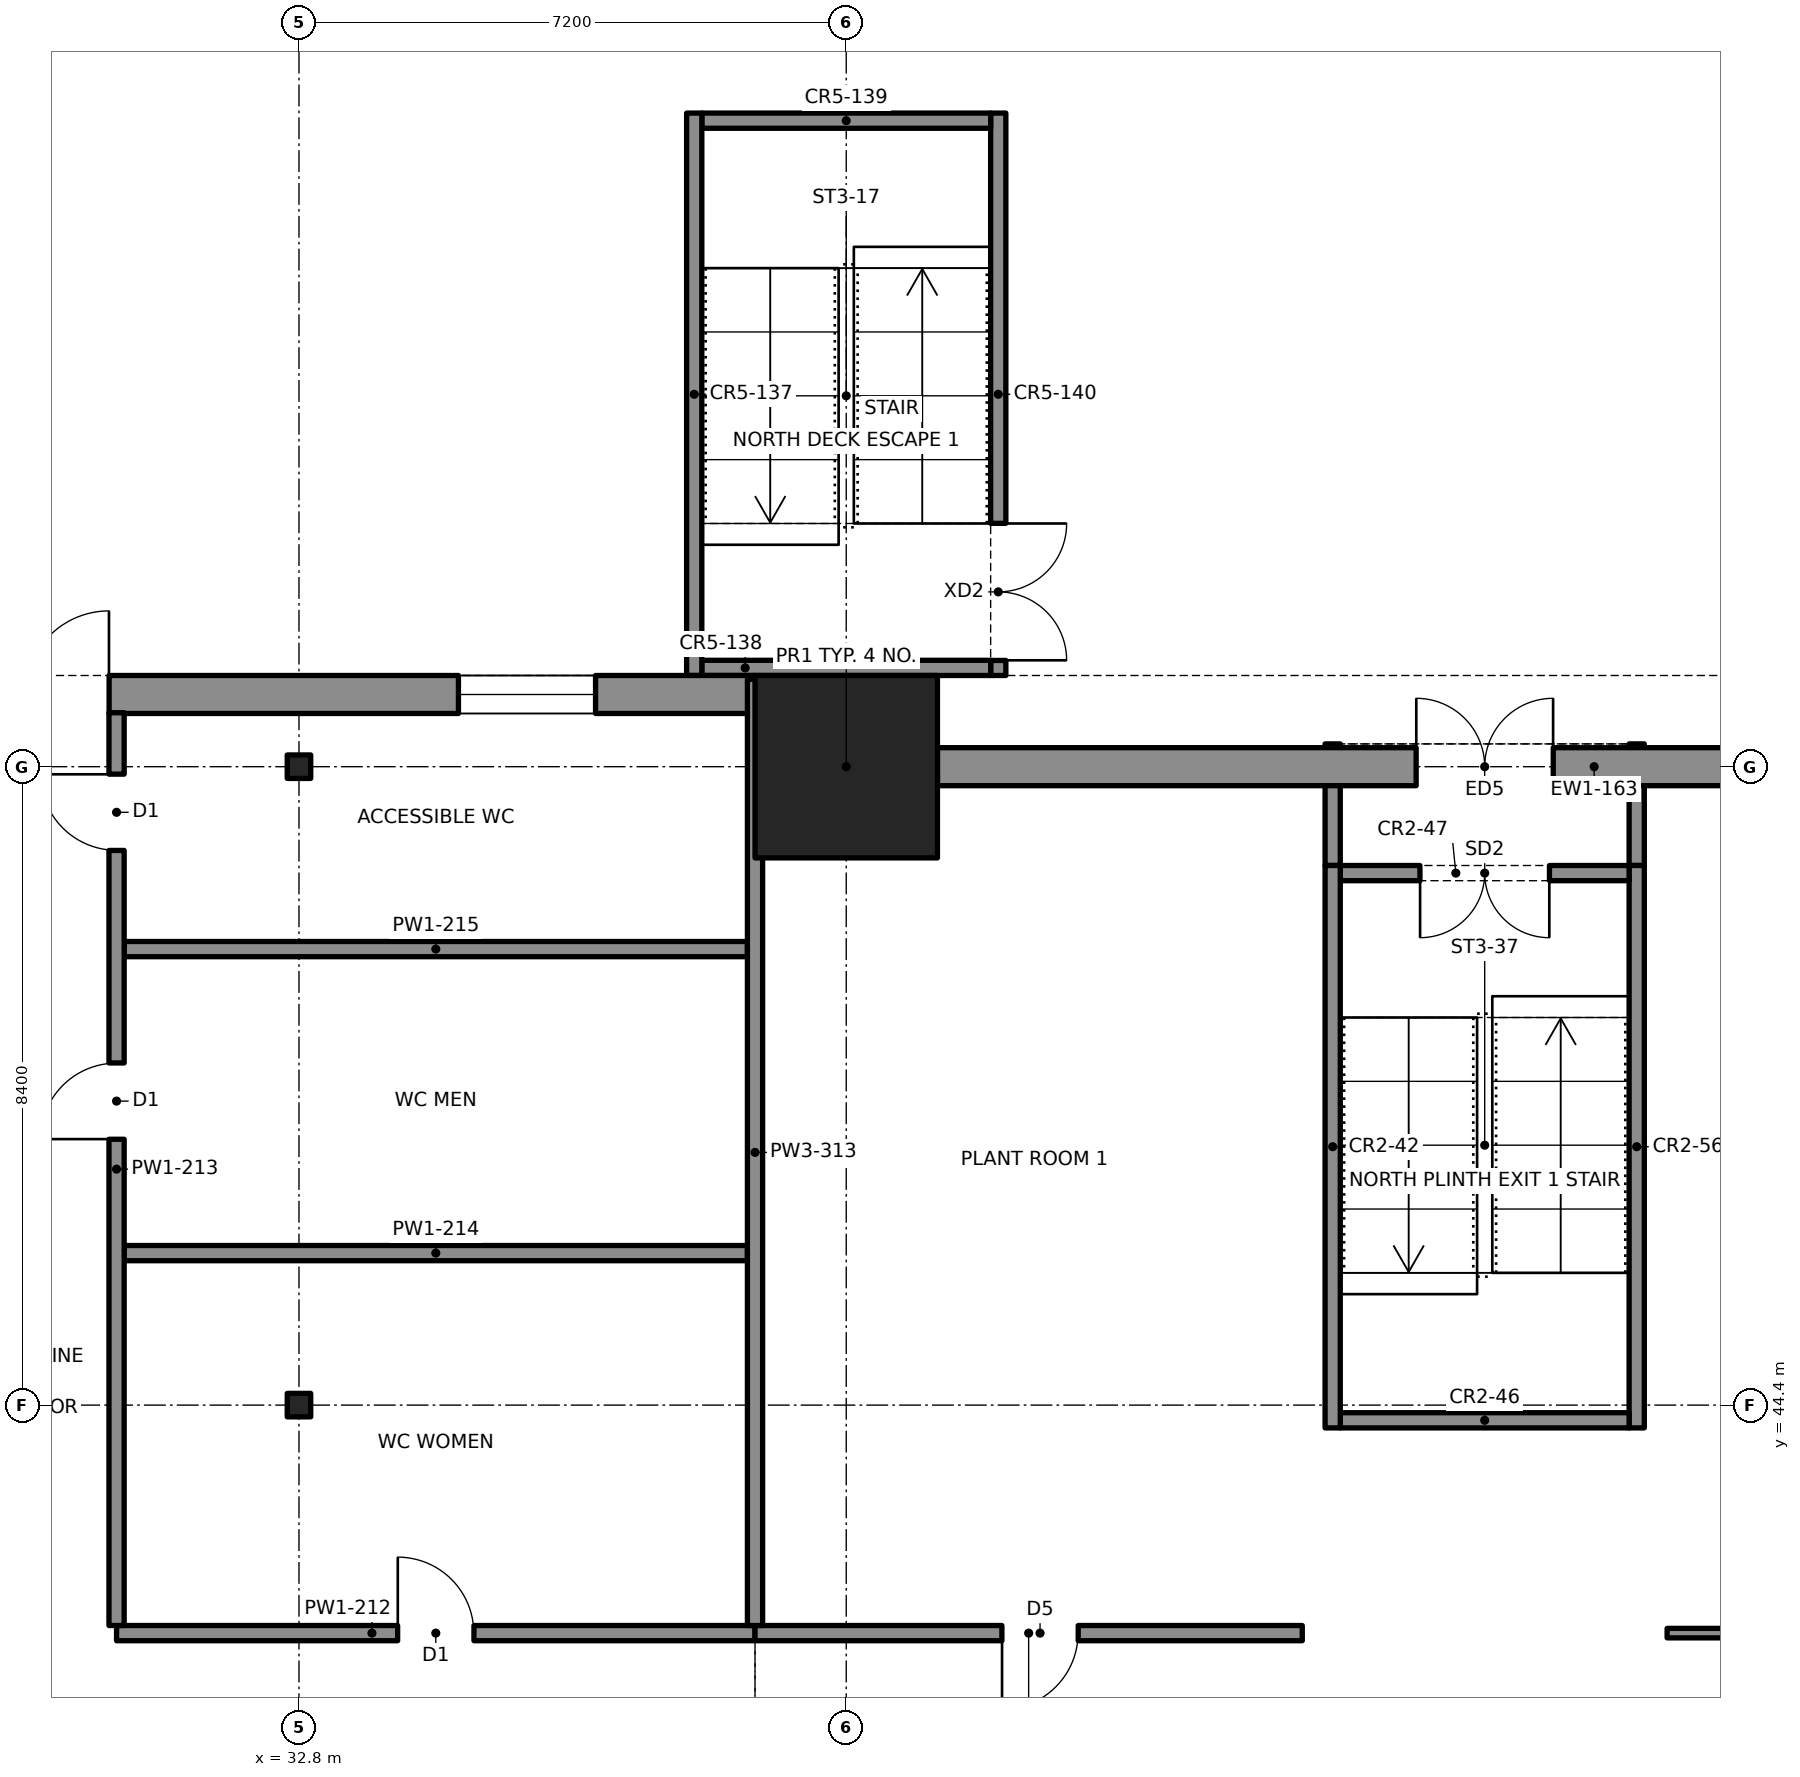
"""IFC4 building model, lengths in metres.
Left out: names, types, materials, properties, quantities, classifications, styles, units other than length and angle.
Written with IfcOpenShell. Run it as: python <this file> out.ifc"""

import sys

from ifc_helpers import new_model, si_unit, direction, frame, frame_2d, origin, origin_2d, place, context, subcontext, project, spatial, rectangle, i_section, extrude, element, fill, save


model = new_model("IFC4")
c1 = context("Model", 3, precision=1e-05, world=origin(), true_north=direction((0.0, 1.0)))
c2 = subcontext(c1, "Body", "Model", "MODEL_VIEW")
j1 = project(units=[si_unit("LENGTHUNIT", "METRE"), si_unit("PLANEANGLEUNIT", "RADIAN")], contexts=[c1])
p1 = place(None, origin())
s1 = spatial("IfcSite", under=j1, at=p1, CompositionType="ELEMENT")
p2 = place(p1, origin())
s2 = spatial("IfcBuilding", under=s1, at=p2, CompositionType="ELEMENT")
p3 = place(p2, origin())
s3 = spatial("IfcBuildingStorey", under=s2, at=p3, CompositionType="ELEMENT", Elevation=0.0)
p4 = place(p3, frame((40.0, 52.8, -0.9), z_axis=(0.0, 0.0, 1.0), x_axis=(1.0, 0.0, 0.0)))
e1 = element("IfcColumn", 1, at=p4, inside=s3, PredefinedType="COLUMN", context=c2, shape_type="SweptSolid", body=[
    extrude(rectangle(XDim=2.4, YDim=2.4, at=origin_2d()), origin(), (0.0, 0.0, 1.0), 5.3),
])
for number, where, z_axis, x_axis in (
    (2, (32.8, 44.4, -0.9), (0.0, 0.0, 1.0), (1.0, 0.0, 0.0)),
    (3, (32.8, 52.8, -0.9), (0.0, 0.0, 1.0), (1.0, 0.0, 0.0)),
):
    element("IfcColumn", number, at=place(p3, frame(where, z_axis=z_axis, x_axis=x_axis)), inside=s3, PredefinedType="COLUMN", context=c2, shape_type="SweptSolid", body=[
        extrude(i_section(OverallWidth=0.309, OverallDepth=0.323, WebThickness=0.014, FlangeThickness=0.023, at=origin_2d()), origin(), (0.0, 0.0, 1.0), 5.3),
    ])
p5 = place(p3, frame((41.2, 52.8, 0.0), z_axis=(0.0, 0.0, 1.0), x_axis=(1.0, 0.0, 0.0)))
e4 = element("IfcWall", 4, at=p5, inside=s3, PredefinedType="SOLIDWALL", context=c2, shape_type="SweptSolid", body=[
    extrude(rectangle(XDim=14.4, YDim=0.5, at=frame_2d((7.2, 0.0))), origin(), (0.0, 0.0, 1.0), 3.65),
])
p6 = place(p5, frame((6.3, 0.0, 0.0)))
e5 = element("IfcOpeningElement", 5, at=p6, cuts=e4, PredefinedType="OPENING", context=c2, shape_type="SweptSolid", body=[
    extrude(rectangle(XDim=1.8, YDim=2.4, at=frame_2d((0.9, 1.2))), frame((0.0, 0.26, 0.0), z_axis=(0.0, -1.0, 0.0), x_axis=(1.0, 0.0, 0.0)), (0.0, 0.0, 1.0), 0.52),
])
p7 = place(p3, frame((17.2, 53.75, 0.0), z_axis=(0.0, 0.0, 1.0), x_axis=(1.0, 0.0, 0.0)))
e6 = element("IfcWall", 6, at=p7, inside=s3, PredefinedType="SOLIDWALL", context=c2, shape_type="SweptSolid", body=[
    extrude(rectangle(XDim=21.6, YDim=0.5, at=frame_2d((10.8, 0.0))), origin(), (0.0, 0.0, 1.0), 4.4),
])
p8 = place(p7, frame((0.9, 0.0, 0.9)))
e7 = element("IfcOpeningElement", 7, at=p8, cuts=e6, PredefinedType="OPENING", context=c2, shape_type="SweptSolid", body=[
    extrude(rectangle(XDim=1.8, YDim=2.0, at=frame_2d((0.9, 1.0))), frame((0.0, 0.26, 0.0), z_axis=(0.0, -1.0, 0.0), x_axis=(1.0, 0.0, 0.0)), (0.0, 0.0, 1.0), 0.52),
])
p9 = place(p7, frame((5.7, 0.0, 0.9)))
e8 = element("IfcOpeningElement", 8, at=p9, cuts=e6, PredefinedType="OPENING", context=c2, shape_type="SweptSolid", body=[
    extrude(rectangle(XDim=1.8, YDim=2.0, at=frame_2d((0.9, 1.0))), frame((0.0, 0.26, 0.0), z_axis=(0.0, -1.0, 0.0), x_axis=(1.0, 0.0, 0.0)), (0.0, 0.0, 1.0), 0.52),
])
p10 = place(p7, frame((17.7, 0.0, 0.9)))
e9 = element("IfcOpeningElement", 9, at=p10, cuts=e6, PredefinedType="OPENING", context=c2, shape_type="SweptSolid", body=[
    extrude(rectangle(XDim=1.8, YDim=2.0, at=frame_2d((0.9, 1.0))), frame((0.0, 0.26, 0.0), z_axis=(0.0, -1.0, 0.0), x_axis=(1.0, 0.0, 0.0)), (0.0, 0.0, 1.0), 0.52),
])
p11 = place(p7, frame((10.9, 0.0, 0.0)))
e10 = element("IfcOpeningElement", 10, at=p11, cuts=e6, PredefinedType="OPENING", context=c2, shape_type="SweptSolid", body=[
    extrude(rectangle(XDim=2.2, YDim=2.4, at=frame_2d((1.1, 1.2))), frame((0.0, 0.26, 0.0), z_axis=(0.0, -1.0, 0.0), x_axis=(1.0, 0.0, 0.0)), (0.0, 0.0, 1.0), 0.52),
])
p12 = place(p3, frame((38.0, 54.0, 0.0), z_axis=(0.0, 0.0, 1.0), x_axis=(0.0, 1.0, 0.0)))
e11 = element("IfcWall", 11, at=p12, inside=s3, PredefinedType="SOLIDWALL", context=c2, shape_type="SweptSolid", body=[
    extrude(rectangle(XDim=7.4, YDim=0.2, at=frame_2d((3.7, 0.0))), origin(), (0.0, 0.0, 1.0), 4.4),
])
p13 = place(p3, frame((42.0, 61.4, 0.0), z_axis=(0.0, 0.0, 1.0), x_axis=(0.0, -1.0, 0.0)))
e12 = element("IfcWall", 12, at=p13, inside=s3, PredefinedType="SOLIDWALL", context=c2, shape_type="SweptSolid", body=[
    extrude(rectangle(XDim=7.4, YDim=0.2, at=frame_2d((3.7, 0.0))), origin(), (0.0, 0.0, 1.0), 4.4),
])
p14 = place(p13, frame((5.4, 0.0, 0.0)))
e13 = element("IfcOpeningElement", 13, at=p14, cuts=e12, PredefinedType="OPENING", context=c2, shape_type="SweptSolid", body=[
    extrude(rectangle(XDim=1.8, YDim=2.1, at=frame_2d((0.9, 1.05))), frame((0.0, 0.11, 0.0), z_axis=(0.0, -1.0, 0.0), x_axis=(1.0, 0.0, 0.0)), (0.0, 0.0, 1.0), 0.22),
])
for number, where, z_axis, x_axis in (
    (14, (38.1, 54.1, 0.0), (0.0, 0.0, 1.0), (1.0, 0.0, 0.0)),
    (15, (38.1, 61.3, 0.0), (0.0, 0.0, 1.0), (1.0, 0.0, 0.0)),
):
    element("IfcWall", number, at=place(p3, frame(where, z_axis=z_axis, x_axis=x_axis)), inside=s3, PredefinedType="SOLIDWALL", context=c2, shape_type="SweptSolid", body=[
        extrude(rectangle(XDim=3.8, YDim=0.2, at=frame_2d((1.9, 0.0))), origin(), (0.0, 0.0, 1.0), 4.4),
    ])
for number, where, z_axis, x_axis in (
    (16, (46.4, 44.1, 0.0), (0.0, 0.0, 1.0), (0.0, 1.0, 0.0)),
    (17, (50.4, 44.1, 0.0), (0.0, 0.0, 1.0), (0.0, 1.0, 0.0)),
):
    element("IfcWall", number, at=place(p3, frame(where, z_axis=z_axis, x_axis=x_axis)), inside=s3, PredefinedType="SOLIDWALL", context=c2, shape_type="SweptSolid", body=[
        extrude(rectangle(XDim=7.4, YDim=0.2, at=frame_2d((3.7, 0.0))), origin(), (0.0, 0.0, 1.0), 4.4),
    ])
p15 = place(p3, frame((46.5, 44.2, 0.0), z_axis=(0.0, 0.0, 1.0), x_axis=(1.0, 0.0, 0.0)))
e18 = element("IfcWall", 18, at=p15, inside=s3, PredefinedType="SOLIDWALL", context=c2, shape_type="SweptSolid", body=[
    extrude(rectangle(XDim=3.8, YDim=0.2, at=frame_2d((1.9, 0.0))), origin(), (0.0, 0.0, 1.0), 4.4),
])
p16 = place(p3, frame((46.5, 51.4, 0.0), z_axis=(0.0, 0.0, 1.0), x_axis=(1.0, 0.0, 0.0)))
e19 = element("IfcWall", 19, at=p16, inside=s3, PredefinedType="SOLIDWALL", context=c2, shape_type="SweptSolid", body=[
    extrude(rectangle(XDim=3.8, YDim=0.2, at=frame_2d((1.9, 0.0))), origin(), (0.0, 0.0, 1.0), 4.4),
])
p17 = place(p16, frame((1.05, 0.0, 0.0)))
e20 = element("IfcOpeningElement", 20, at=p17, cuts=e19, PredefinedType="OPENING", context=c2, shape_type="SweptSolid", body=[
    extrude(rectangle(XDim=1.7, YDim=2.1, at=frame_2d((0.85, 1.05))), frame((0.0, 0.11, 0.0), z_axis=(0.0, -1.0, 0.0), x_axis=(1.0, 0.0, 0.0)), (0.0, 0.0, 1.0), 0.22),
])
for number, where, z_axis, x_axis in (
    (21, (46.4, 51.5, 0.0), (0.0, 0.0, 1.0), (0.0, 1.0, 0.0)),
    (22, (50.4, 51.5, 0.0), (0.0, 0.0, 1.0), (0.0, 1.0, 0.0)),
):
    element("IfcWall", number, at=place(p3, frame(where, z_axis=z_axis, x_axis=x_axis)), inside=s3, PredefinedType="SOLIDWALL", context=c2, shape_type="SweptSolid", body=[
        extrude(rectangle(XDim=1.6, YDim=0.2, at=frame_2d((0.8, 0.0))), origin(), (0.0, 0.0, 1.0), 4.4),
    ])
p18 = place(p3, frame((30.4, 41.4, 0.0), z_axis=(0.0, 0.0, 1.0), x_axis=(1.0, 0.0, 0.0)))
e23 = element("IfcWall", 23, at=p18, inside=s3, PredefinedType="PARTITIONING", context=c2, shape_type="SweptSolid", body=[
    extrude(rectangle(XDim=8.4, YDim=0.2, at=frame_2d((4.2, 0.0))), origin(), (0.0, 0.0, 1.0), 3.65),
])
p19 = place(p18, frame((3.7, 0.0, 0.0)))
e24 = element("IfcOpeningElement", 24, at=p19, cuts=e23, PredefinedType="OPENING", context=c2, shape_type="SweptSolid", body=[
    extrude(rectangle(XDim=1.0, YDim=2.1, at=frame_2d((0.5, 1.05))), frame((0.0, 0.11, 0.0), z_axis=(0.0, -1.0, 0.0), x_axis=(1.0, 0.0, 0.0)), (0.0, 0.0, 1.0), 0.22),
])
p20 = place(p3, frame((38.8, 41.4, 0.0), z_axis=(0.0, 0.0, 1.0), x_axis=(1.0, 0.0, 0.0)))
e25 = element("IfcWall", 25, at=p20, inside=s3, PredefinedType="PARTITIONING", context=c2, shape_type="SweptSolid", body=[
    extrude(rectangle(XDim=7.2, YDim=0.2, at=frame_2d((3.6, 0.0))), origin(), (0.0, 0.0, 1.0), 3.65),
])
p21 = place(p20, frame((3.25, 0.0, 0.0)))
e26 = element("IfcOpeningElement", 26, at=p21, cuts=e25, PredefinedType="OPENING", context=c2, shape_type="SweptSolid", body=[
    extrude(rectangle(XDim=1.0, YDim=2.1, at=frame_2d((0.5, 1.05))), frame((0.0, 0.11, 0.0), z_axis=(0.0, -1.0, 0.0), x_axis=(1.0, 0.0, 0.0)), (0.0, 0.0, 1.0), 0.22),
])
p22 = place(p3, frame((50.8, 41.4, 0.0), z_axis=(0.0, 0.0, 1.0), x_axis=(1.0, 0.0, 0.0)))
e27 = element("IfcWall", 27, at=p22, inside=s3, PredefinedType="PARTITIONING", context=c2, shape_type="SweptSolid", body=[
    extrude(rectangle(XDim=14.4, YDim=0.125, at=frame_2d((7.2, 0.0))), origin(), (0.0, 0.0, 1.0), 3.65),
])
p23 = place(p22, frame((6.15, 0.0, 0.0)))
e28 = element("IfcOpeningElement", 28, at=p23, cuts=e27, PredefinedType="OPENING", context=c2, shape_type="SweptSolid", body=[
    extrude(rectangle(XDim=1.8, YDim=2.1, at=frame_2d((0.9, 1.05))), frame((0.0, 0.073, 0.0), z_axis=(0.0, -1.0, 0.0), x_axis=(1.0, 0.0, 0.0)), (0.0, 0.0, 1.0), 0.145),
])
for number, where, z_axis, x_axis in (
    (29, (30.5, 46.4, 0.0), (0.0, 0.0, 1.0), (1.0, 0.0, 0.0)),
    (30, (30.5, 50.4, 0.0), (0.0, 0.0, 1.0), (1.0, 0.0, 0.0)),
):
    element("IfcWall", number, at=place(p3, frame(where, z_axis=z_axis, x_axis=x_axis)), inside=s3, PredefinedType="PARTITIONING", context=c2, shape_type="SweptSolid", body=[
        extrude(rectangle(XDim=8.2, YDim=0.2, at=frame_2d((4.1, 0.0))), origin(), (0.0, 0.0, 1.0), 3.65),
    ])
p24 = place(p3, frame((30.4, 41.5, 0.0), z_axis=(0.0, 0.0, 1.0), x_axis=(0.0, 1.0, 0.0)))
e31 = element("IfcWall", 31, at=p24, inside=s3, PredefinedType="PARTITIONING", context=c2, shape_type="SweptSolid", body=[
    extrude(rectangle(XDim=12.01, YDim=0.2, at=frame_2d((6.005, 0.0))), origin(), (0.0, 0.0, 1.0), 3.65),
])
p25 = place(p24, frame((6.4, 0.0, 0.0)))
e32 = element("IfcOpeningElement", 32, at=p25, cuts=e31, PredefinedType="OPENING", context=c2, shape_type="SweptSolid", body=[
    extrude(rectangle(XDim=1.0, YDim=2.1, at=frame_2d((0.5, 1.05))), frame((0.0, 0.11, 0.0), z_axis=(0.0, -1.0, 0.0), x_axis=(1.0, 0.0, 0.0)), (0.0, 0.0, 1.0), 0.22),
])
p26 = place(p24, frame((10.2, 0.0, 0.0)))
e33 = element("IfcOpeningElement", 33, at=p26, cuts=e31, PredefinedType="OPENING", context=c2, shape_type="SweptSolid", body=[
    extrude(rectangle(XDim=1.0, YDim=2.1, at=frame_2d((0.5, 1.05))), frame((0.0, 0.11, 0.0), z_axis=(0.0, -1.0, 0.0), x_axis=(1.0, 0.0, 0.0)), (0.0, 0.0, 1.0), 0.22),
])
p27 = place(p3, frame((38.8, 41.5, 0.0), z_axis=(0.0, 0.0, 1.0), x_axis=(0.0, 1.0, 0.0)))
e34 = element("IfcWall", 34, at=p27, inside=s3, PredefinedType="PARTITIONING", context=c2, shape_type="SweptSolid", body=[
    extrude(rectangle(XDim=12.45, YDim=0.2, at=frame_2d((6.225, 0.0))), origin(), (0.0, 0.0, 1.0), 3.65),
])
p28 = place(p6, origin())
e35 = element("IfcDoor", 35, at=p28, inside=s3, OperationType="DOUBLE_DOOR_SINGLE_SWING", PredefinedType="DOOR", context=c2, shape_type="SweptSolid", body=[
    extrude(rectangle(XDim=1.8, YDim=2.4, at=frame_2d((0.9, 1.2))), frame((0.0, 0.025, 0.0), z_axis=(0.0, -1.0, 0.0), x_axis=(1.0, 0.0, 0.0)), (0.0, 0.0, 1.0), 0.05),
])
fill(e5, e35)
p29 = place(p10, origin())
e36 = element("IfcWindow", 36, at=p29, inside=s3, PartitioningType="SINGLE_PANEL", PredefinedType="WINDOW", context=c2, shape_type="SweptSolid", body=[
    extrude(rectangle(XDim=1.8, YDim=2.0, at=frame_2d((0.9, 1.0))), frame((0.0, 0.03, 0.0), z_axis=(0.0, -1.0, 0.0), x_axis=(1.0, 0.0, 0.0)), (0.0, 0.0, 1.0), 0.06),
])
fill(e9, e36)
p30 = place(p11, origin())
e37 = element("IfcDoor", 37, at=p30, inside=s3, OperationType="DOUBLE_DOOR_SINGLE_SWING", PredefinedType="DOOR", context=c2, shape_type="SweptSolid", body=[
    extrude(rectangle(XDim=2.2, YDim=2.4, at=frame_2d((1.1, 1.2))), frame((0.0, 0.025, 0.0), z_axis=(0.0, -1.0, 0.0), x_axis=(1.0, 0.0, 0.0)), (0.0, 0.0, 1.0), 0.05),
])
fill(e10, e37)
p31 = place(p14, origin())
e38 = element("IfcDoor", 38, at=p31, inside=s3, OperationType="DOUBLE_DOOR_SINGLE_SWING", PredefinedType="DOOR", context=c2, shape_type="SweptSolid", body=[
    extrude(rectangle(XDim=1.8, YDim=2.1, at=frame_2d((0.9, 1.05))), frame((0.0, 0.025, 0.0), z_axis=(0.0, -1.0, 0.0), x_axis=(1.0, 0.0, 0.0)), (0.0, 0.0, 1.0), 0.05),
])
fill(e13, e38)
p32 = place(p17, origin())
e39 = element("IfcDoor", 39, at=p32, inside=s3, OperationType="DOUBLE_DOOR_SINGLE_SWING", PredefinedType="DOOR", context=c2, shape_type="SweptSolid", body=[
    extrude(rectangle(XDim=1.7, YDim=2.1, at=frame_2d((0.85, 1.05))), frame((0.0, 0.025, 0.0), z_axis=(0.0, -1.0, 0.0), x_axis=(1.0, 0.0, 0.0)), (0.0, 0.0, 1.0), 0.05),
])
fill(e20, e39)
p33 = place(p19, origin())
e40 = element("IfcDoor", 40, at=p33, inside=s3, OperationType="SINGLE_SWING_LEFT", PredefinedType="DOOR", context=c2, shape_type="SweptSolid", body=[
    extrude(rectangle(XDim=1.0, YDim=2.1, at=frame_2d((0.5, 1.05))), frame((0.0, 0.025, 0.0), z_axis=(0.0, -1.0, 0.0), x_axis=(1.0, 0.0, 0.0)), (0.0, 0.0, 1.0), 0.05),
])
fill(e24, e40)
p34 = place(p25, origin())
e41 = element("IfcDoor", 41, at=p34, inside=s3, OperationType="SINGLE_SWING_LEFT", PredefinedType="DOOR", context=c2, shape_type="SweptSolid", body=[
    extrude(rectangle(XDim=1.0, YDim=2.1, at=frame_2d((0.5, 1.05))), frame((0.0, 0.025, 0.0), z_axis=(0.0, -1.0, 0.0), x_axis=(1.0, 0.0, 0.0)), (0.0, 0.0, 1.0), 0.05),
])
fill(e32, e41)
p35 = place(p26, origin())
e42 = element("IfcDoor", 42, at=p35, inside=s3, OperationType="SINGLE_SWING_RIGHT", PredefinedType="DOOR", context=c2, shape_type="SweptSolid", body=[
    extrude(rectangle(XDim=1.0, YDim=2.1, at=frame_2d((0.5, 1.05))), frame((0.0, 0.025, 0.0), z_axis=(0.0, -1.0, 0.0), x_axis=(1.0, 0.0, 0.0)), (0.0, 0.0, 1.0), 0.05),
])
fill(e33, e42)
p36 = place(p21, origin())
e43 = element("IfcDoor", 43, at=p36, inside=s3, OperationType="SINGLE_SWING_LEFT", PredefinedType="DOOR", context=c2, shape_type="SweptSolid", body=[
    extrude(rectangle(XDim=1.0, YDim=2.1, at=frame_2d((0.5, 1.05))), frame((0.0, 0.025, 0.0), z_axis=(0.0, -1.0, 0.0), x_axis=(1.0, 0.0, 0.0)), (0.0, 0.0, 1.0), 0.05),
])
fill(e26, e43)
save(model, sys.argv[1])
